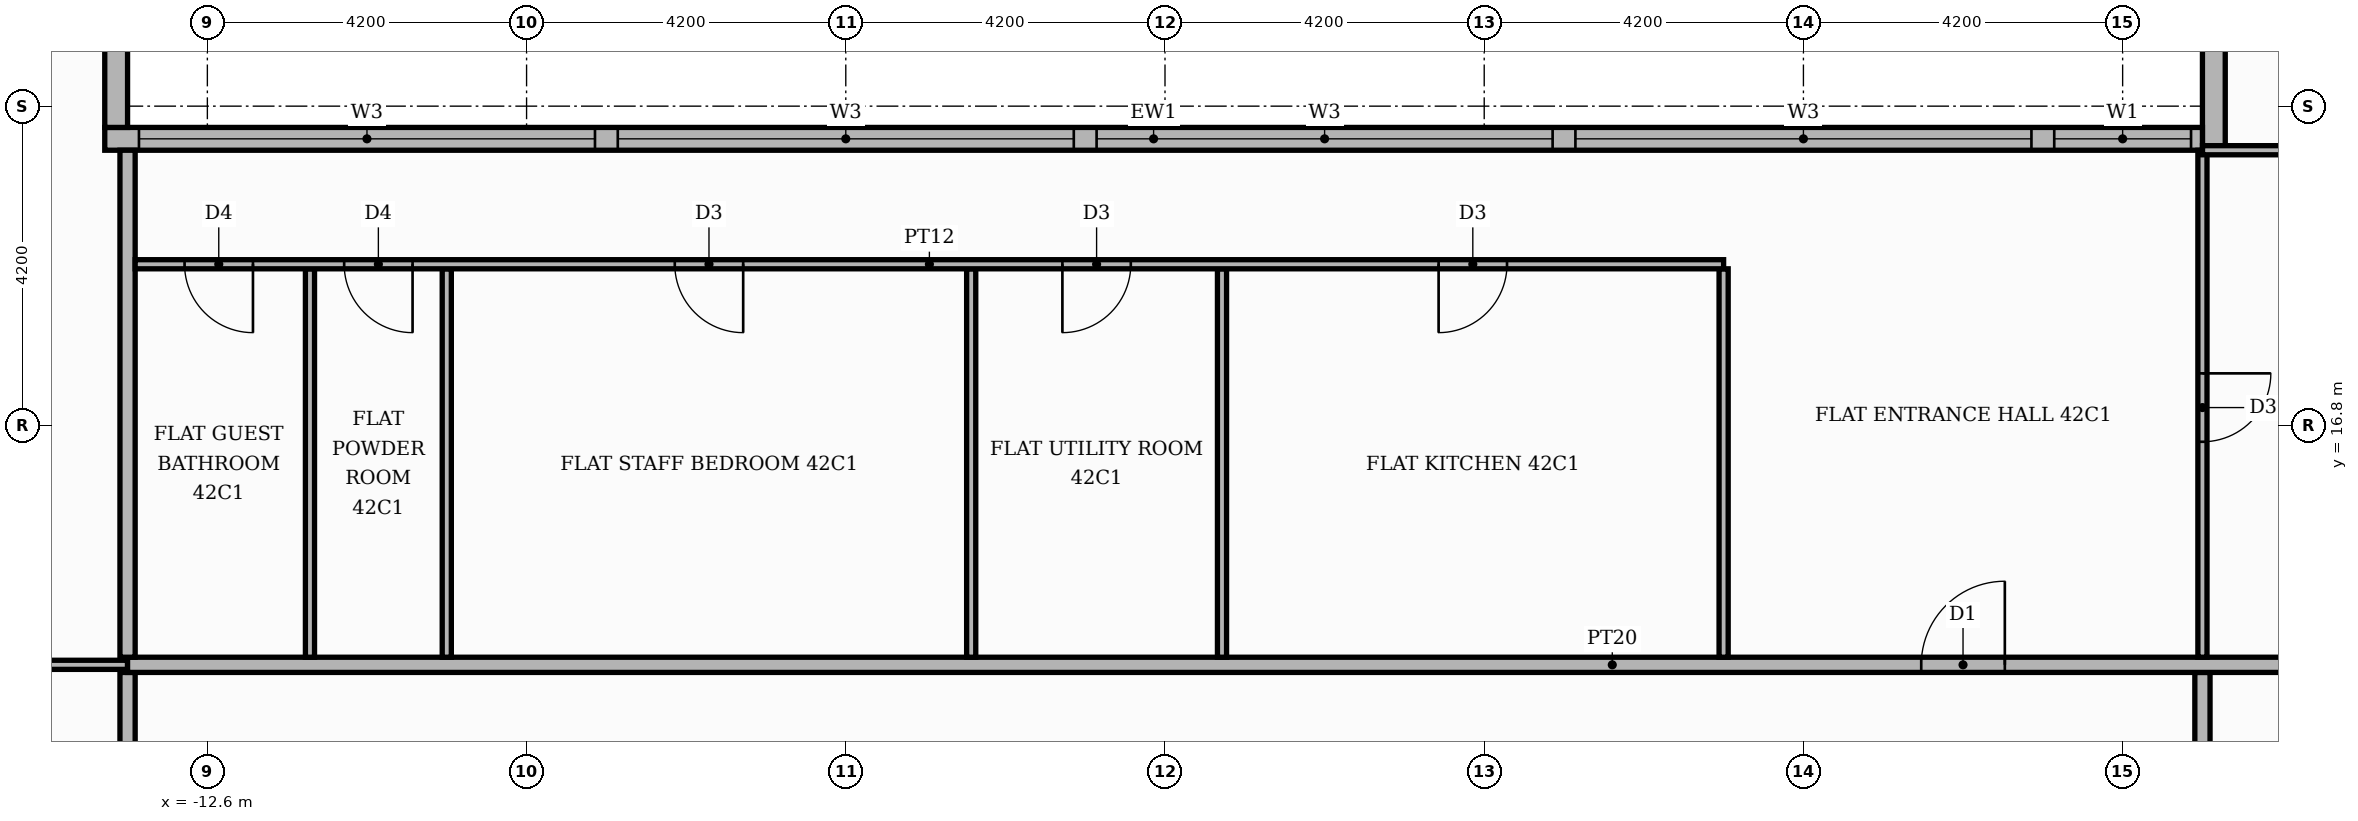
"""IFC4 building model, lengths in metres.
Left out: names, types, materials, properties, quantities, classifications, styles, units other than length and angle.
Written with IfcOpenShell. Run it as: python <this file> out.ifc"""

import sys

from ifc_helpers import new_model, si_unit, direction, frame, frame_2d, origin, place, context, subcontext, project, spatial, rectangle, extrude, element, fill, save


model = new_model("IFC4")
c1 = context("Model", 3, precision=1e-05, world=origin(), true_north=direction((0.0, 1.0)))
c2 = subcontext(c1, "Body", "Model", "MODEL_VIEW")
j1 = project(units=[si_unit("LENGTHUNIT", "METRE"), si_unit("PLANEANGLEUNIT", "RADIAN")], contexts=[c1])
p1 = place(None, origin())
s1 = spatial("IfcSite", under=j1, at=p1, CompositionType="ELEMENT")
p2 = place(p1, origin())
s2 = spatial("IfcBuilding", under=s1, at=p2, CompositionType="ELEMENT")
p3 = place(p2, frame((0.0, 0.0, 176.7)))
s3 = spatial("IfcBuildingStorey", under=s2, at=p3, CompositionType="ELEMENT", Elevation=176.7)
p4 = place(p3, frame((13.8, 25.42, 0.0), z_axis=(0.0, 0.0, 1.0), x_axis=(0.0, -1.0, 0.0)))
e1 = element("IfcWall", 1, at=p4, inside=s3, PredefinedType="STANDARD", context=c2, shape_type="SweptSolid", body=[
    extrude(rectangle(XDim=5.0, YDim=0.3, at=frame_2d((2.5, 0.0))), origin(), (0.0, 0.0, 1.0), 3.4),
])
p5 = place(p4, frame((1.42, 0.0, 0.9)))
e2 = element("IfcOpeningElement", 2, at=p5, cuts=e1, PredefinedType="OPENING", context=c2, shape_type="SweptSolid", body=[
    extrude(rectangle(XDim=1.8, YDim=2.1, at=frame_2d((0.9, 1.05))), frame((0.0, 0.16, 0.0), z_axis=(0.0, -1.0, 0.0), x_axis=(1.0, 0.0, 0.0)), (0.0, 0.0, 1.0), 0.32),
])
p6 = place(p3, frame((13.65, 20.57, 0.0), z_axis=(0.0, 0.0, 1.0), x_axis=(-1.0, 0.0, 0.0)))
e3 = element("IfcWall", 3, at=p6, inside=s3, PredefinedType="STANDARD", context=c2, shape_type="SweptSolid", body=[
    extrude(rectangle(XDim=27.6, YDim=0.3, at=frame_2d((13.8, 0.0))), origin(), (0.0, 0.0, 1.0), 3.4),
])
p7 = place(p6, frame((0.15, 0.0, 0.9)))
e4 = element("IfcOpeningElement", 4, at=p7, cuts=e3, PredefinedType="OPENING", context=c2, shape_type="SweptSolid", body=[
    extrude(rectangle(XDim=1.8, YDim=2.1, at=frame_2d((0.9, 1.05))), frame((0.0, 0.16, 0.0), z_axis=(0.0, -1.0, 0.0), x_axis=(1.0, 0.0, 0.0)), (0.0, 0.0, 1.0), 0.32),
])
p8 = place(p6, frame((2.25, 0.0, 0.9)))
e5 = element("IfcOpeningElement", 5, at=p8, cuts=e3, PredefinedType="OPENING", context=c2, shape_type="SweptSolid", body=[
    extrude(rectangle(XDim=6.0, YDim=2.1, at=frame_2d((3.0, 1.05))), frame((0.0, 0.16, 0.0), z_axis=(0.0, -1.0, 0.0), x_axis=(1.0, 0.0, 0.0)), (0.0, 0.0, 1.0), 0.32),
])
p9 = place(p6, frame((8.55, 0.0, 0.9)))
e6 = element("IfcOpeningElement", 6, at=p9, cuts=e3, PredefinedType="OPENING", context=c2, shape_type="SweptSolid", body=[
    extrude(rectangle(XDim=6.0, YDim=2.1, at=frame_2d((3.0, 1.05))), frame((0.0, 0.16, 0.0), z_axis=(0.0, -1.0, 0.0), x_axis=(1.0, 0.0, 0.0)), (0.0, 0.0, 1.0), 0.32),
])
p10 = place(p6, frame((14.85, 0.0, 0.9)))
e7 = element("IfcOpeningElement", 7, at=p10, cuts=e3, PredefinedType="OPENING", context=c2, shape_type="SweptSolid", body=[
    extrude(rectangle(XDim=6.0, YDim=2.1, at=frame_2d((3.0, 1.05))), frame((0.0, 0.16, 0.0), z_axis=(0.0, -1.0, 0.0), x_axis=(1.0, 0.0, 0.0)), (0.0, 0.0, 1.0), 0.32),
])
p11 = place(p6, frame((21.15, 0.0, 0.9)))
e8 = element("IfcOpeningElement", 8, at=p11, cuts=e3, PredefinedType="OPENING", context=c2, shape_type="SweptSolid", body=[
    extrude(rectangle(XDim=6.0, YDim=2.1, at=frame_2d((3.0, 1.05))), frame((0.0, 0.16, 0.0), z_axis=(0.0, -1.0, 0.0), x_axis=(1.0, 0.0, 0.0)), (0.0, 0.0, 1.0), 0.32),
])
p12 = place(p3, frame((-13.8, 20.72, 0.0), z_axis=(0.0, 0.0, 1.0), x_axis=(0.0, 1.0, 0.0)))
e9 = element("IfcWall", 9, at=p12, inside=s3, PredefinedType="STANDARD", context=c2, shape_type="SweptSolid", body=[
    extrude(rectangle(XDim=5.0, YDim=0.3, at=frame_2d((2.5, 0.0))), origin(), (0.0, 0.0, 1.0), 3.4),
])
p13 = place(p12, frame((1.48, 0.0, 0.9)))
e10 = element("IfcOpeningElement", 10, at=p13, cuts=e9, PredefinedType="OPENING", context=c2, shape_type="SweptSolid", body=[
    extrude(rectangle(XDim=1.8, YDim=2.1, at=frame_2d((0.9, 1.05))), frame((0.0, 0.16, 0.0), z_axis=(0.0, -1.0, 0.0), x_axis=(1.0, 0.0, 0.0)), (0.0, 0.0, 1.0), 0.32),
])
for number, where, z_axis, x_axis in (
    (11, (-13.65, 11.1, 0.0), (0.0, 0.0, 1.0), (0.0, 1.0, 0.0)),
    (12, (13.65, 11.1, 0.0), (0.0, 0.0, 1.0), (0.0, 1.0, 0.0)),
):
    element("IfcWall", number, at=place(p3, frame(where, z_axis=z_axis, x_axis=x_axis)), inside=s3, PredefinedType="PARTITIONING", context=c2, shape_type="SweptSolid", body=[
        extrude(rectangle(XDim=2.45, YDim=0.2, at=frame_2d((1.225, 0.0))), origin(), (0.0, 0.0, 1.0), 3.4),
    ])
p14 = place(p3, frame((-20.72, 13.65, 0.0), z_axis=(0.0, 0.0, 1.0), x_axis=(1.0, 0.0, 0.0)))
e13 = element("IfcWall", 13, at=p14, inside=s3, PredefinedType="PARTITIONING", context=c2, shape_type="SweptSolid", body=[
    extrude(rectangle(XDim=7.07, YDim=0.12, at=frame_2d((3.535, 0.0))), origin(), (0.0, 0.0, 1.0), 3.4),
])
p15 = place(p14, frame((3.085, 0.0, 0.0)))
e14 = element("IfcOpeningElement", 14, at=p15, cuts=e13, PredefinedType="OPENING", context=c2, shape_type="SweptSolid", body=[
    extrude(rectangle(XDim=0.9, YDim=2.1, at=frame_2d((0.45, 1.05))), frame((0.0, 0.07, 0.0), z_axis=(0.0, -1.0, 0.0), x_axis=(1.0, 0.0, 0.0)), (0.0, 0.0, 1.0), 0.14),
])
p16 = place(p3, frame((-13.65, 13.65, 0.0), z_axis=(0.0, 0.0, 1.0), x_axis=(1.0, 0.0, 0.0)))
e15 = element("IfcWall", 15, at=p16, inside=s3, PredefinedType="PARTITIONING", context=c2, shape_type="SweptSolid", body=[
    extrude(rectangle(XDim=39.07, YDim=0.2, at=frame_2d((19.535, 0.0))), origin(), (0.0, 0.0, 1.0), 3.4),
])
p17 = place(p16, frame((23.6, 0.0, 0.0)))
e16 = element("IfcOpeningElement", 16, at=p17, cuts=e15, PredefinedType="OPENING", context=c2, shape_type="SweptSolid", body=[
    extrude(rectangle(XDim=1.1, YDim=2.4, at=frame_2d((0.55, 1.2))), frame((0.0, 0.11, 0.0), z_axis=(0.0, -1.0, 0.0), x_axis=(1.0, 0.0, 0.0)), (0.0, 0.0, 1.0), 0.22),
])
p18 = place(p3, frame((-13.65, 13.75, 0.0), z_axis=(0.0, 0.0, 1.0), x_axis=(0.0, 1.0, 0.0)))
e17 = element("IfcWall", 17, at=p18, inside=s3, PredefinedType="PARTITIONING", context=c2, shape_type="SweptSolid", body=[
    extrude(rectangle(XDim=6.67, YDim=0.2, at=frame_2d((3.335, 0.0))), origin(), (0.0, 0.0, 1.0), 3.4),
])
for number, where, z_axis, x_axis in (
    (18, (-11.25, 13.75, 0.0), (0.0, 0.0, 1.0), (0.0, 1.0, 0.0)),
    (19, (-9.45, 13.75, 0.0), (0.0, 0.0, 1.0), (0.0, 1.0, 0.0)),
    (20, (-2.55, 13.75, 0.0), (0.0, 0.0, 1.0), (0.0, 1.0, 0.0)),
    (21, (0.75, 13.75, 0.0), (0.0, 0.0, 1.0), (0.0, 1.0, 0.0)),
    (22, (7.35, 13.75, 0.0), (0.0, 0.0, 1.0), (0.0, 1.0, 0.0)),
):
    element("IfcWall", number, at=place(p3, frame(where, z_axis=z_axis, x_axis=x_axis)), inside=s3, PredefinedType="PARTITIONING", context=c2, shape_type="SweptSolid", body=[
        extrude(rectangle(XDim=5.11, YDim=0.12, at=frame_2d((2.555, 0.0))), origin(), (0.0, 0.0, 1.0), 3.4),
    ])
p19 = place(p3, frame((13.65, 13.75, 0.0), z_axis=(0.0, 0.0, 1.0), x_axis=(0.0, 1.0, 0.0)))
e23 = element("IfcWall", 23, at=p19, inside=s3, PredefinedType="PARTITIONING", context=c2, shape_type="SweptSolid", body=[
    extrude(rectangle(XDim=6.669, YDim=0.12, at=frame_2d((3.334, 0.0))), origin(), (0.0, 0.0, 1.0), 3.4),
])
p20 = place(p19, frame((2.834, 0.0, 0.0)))
e24 = element("IfcOpeningElement", 24, at=p20, cuts=e23, PredefinedType="OPENING", context=c2, shape_type="SweptSolid", body=[
    extrude(rectangle(XDim=0.9, YDim=2.1, at=frame_2d((0.45, 1.05))), frame((0.0, 0.07, 0.0), z_axis=(0.0, -1.0, 0.0), x_axis=(1.0, 0.0, 0.0)), (0.0, 0.0, 1.0), 0.14),
])
p21 = place(p3, frame((-13.55, 18.92, 0.0), z_axis=(0.0, 0.0, 1.0), x_axis=(1.0, 0.0, 0.0)))
e25 = element("IfcWall", 25, at=p21, inside=s3, PredefinedType="PARTITIONING", context=c2, shape_type="SweptSolid", body=[
    extrude(rectangle(XDim=20.9, YDim=0.12, at=frame_2d((10.45, 0.0))), origin(), (0.0, 0.0, 1.0), 3.4),
])
p22 = place(p21, frame((17.15, 0.0, 0.0)))
e26 = element("IfcOpeningElement", 26, at=p22, cuts=e25, PredefinedType="OPENING", context=c2, shape_type="SweptSolid", body=[
    extrude(rectangle(XDim=0.9, YDim=2.1, at=frame_2d((0.45, 1.05))), frame((0.0, 0.07, 0.0), z_axis=(0.0, -1.0, 0.0), x_axis=(1.0, 0.0, 0.0)), (0.0, 0.0, 1.0), 0.14),
])
p23 = place(p21, frame((12.2, 0.0, 0.0)))
e27 = element("IfcOpeningElement", 27, at=p23, cuts=e25, PredefinedType="OPENING", context=c2, shape_type="SweptSolid", body=[
    extrude(rectangle(XDim=0.9, YDim=2.1, at=frame_2d((0.45, 1.05))), frame((0.0, 0.07, 0.0), z_axis=(0.0, -1.0, 0.0), x_axis=(1.0, 0.0, 0.0)), (0.0, 0.0, 1.0), 0.14),
])
p24 = place(p21, frame((7.1, 0.0, 0.0)))
e28 = element("IfcOpeningElement", 28, at=p24, cuts=e25, PredefinedType="OPENING", context=c2, shape_type="SweptSolid", body=[
    extrude(rectangle(XDim=0.9, YDim=2.1, at=frame_2d((0.45, 1.05))), frame((0.0, 0.07, 0.0), z_axis=(0.0, -1.0, 0.0), x_axis=(1.0, 0.0, 0.0)), (0.0, 0.0, 1.0), 0.14),
])
p25 = place(p21, frame((2.75, 0.0, 0.0)))
e29 = element("IfcOpeningElement", 29, at=p25, cuts=e25, PredefinedType="OPENING", context=c2, shape_type="SweptSolid", body=[
    extrude(rectangle(XDim=0.9, YDim=2.1, at=frame_2d((0.45, 1.05))), frame((0.0, 0.07, 0.0), z_axis=(0.0, -1.0, 0.0), x_axis=(1.0, 0.0, 0.0)), (0.0, 0.0, 1.0), 0.14),
])
p26 = place(p21, frame((0.65, 0.0, 0.0)))
e30 = element("IfcOpeningElement", 30, at=p26, cuts=e25, PredefinedType="OPENING", context=c2, shape_type="SweptSolid", body=[
    extrude(rectangle(XDim=0.9, YDim=2.1, at=frame_2d((0.45, 1.05))), frame((0.0, 0.07, 0.0), z_axis=(0.0, -1.0, 0.0), x_axis=(1.0, 0.0, 0.0)), (0.0, 0.0, 1.0), 0.14),
])
p27 = place(p3, frame((13.651, 20.42, 0.0), z_axis=(0.0, 0.0, 1.0), x_axis=(1.0, 0.0, 0.0)))
e31 = element("IfcWall", 31, at=p27, inside=s3, PredefinedType="PARTITIONING", context=c2, shape_type="SweptSolid", body=[
    extrude(rectangle(XDim=11.769, YDim=0.12, at=frame_2d((5.885, 0.0))), origin(), (0.0, 0.0, 1.0), 3.4),
])
p28 = place(p27, frame((7.345, 0.0, 0.0)))
e32 = element("IfcOpeningElement", 32, at=p28, cuts=e31, PredefinedType="OPENING", context=c2, shape_type="SweptSolid", body=[
    extrude(rectangle(XDim=1.0, YDim=2.1, at=frame_2d((0.5, 1.05))), frame((0.0, 0.07, 0.0), z_axis=(0.0, -1.0, 0.0), x_axis=(1.0, 0.0, 0.0)), (0.0, 0.0, 1.0), 0.14),
])
p29 = place(p7, origin())
e33 = element("IfcWindow", 33, at=p29, inside=s3, PartitioningType="SINGLE_PANEL", PredefinedType="WINDOW", context=c2, shape_type="SweptSolid", body=[
    extrude(rectangle(XDim=1.8, YDim=2.1, at=frame_2d((0.9, 1.05))), frame((0.0, 0.03, 0.0), z_axis=(0.0, -1.0, 0.0), x_axis=(1.0, 0.0, 0.0)), (0.0, 0.0, 1.0), 0.06),
])
fill(e4, e33)
p30 = place(p8, origin())
e34 = element("IfcWindow", 34, at=p30, inside=s3, PartitioningType="SINGLE_PANEL", PredefinedType="WINDOW", context=c2, shape_type="SweptSolid", body=[
    extrude(rectangle(XDim=6.0, YDim=2.1, at=frame_2d((3.0, 1.05))), frame((0.0, 0.03, 0.0), z_axis=(0.0, -1.0, 0.0), x_axis=(1.0, 0.0, 0.0)), (0.0, 0.0, 1.0), 0.06),
])
fill(e5, e34)
p31 = place(p9, origin())
e35 = element("IfcWindow", 35, at=p31, inside=s3, PartitioningType="SINGLE_PANEL", PredefinedType="WINDOW", context=c2, shape_type="SweptSolid", body=[
    extrude(rectangle(XDim=6.0, YDim=2.1, at=frame_2d((3.0, 1.05))), frame((0.0, 0.03, 0.0), z_axis=(0.0, -1.0, 0.0), x_axis=(1.0, 0.0, 0.0)), (0.0, 0.0, 1.0), 0.06),
])
fill(e6, e35)
p32 = place(p10, origin())
e36 = element("IfcWindow", 36, at=p32, inside=s3, PartitioningType="SINGLE_PANEL", PredefinedType="WINDOW", context=c2, shape_type="SweptSolid", body=[
    extrude(rectangle(XDim=6.0, YDim=2.1, at=frame_2d((3.0, 1.05))), frame((0.0, 0.03, 0.0), z_axis=(0.0, -1.0, 0.0), x_axis=(1.0, 0.0, 0.0)), (0.0, 0.0, 1.0), 0.06),
])
fill(e7, e36)
p33 = place(p11, origin())
e37 = element("IfcWindow", 37, at=p33, inside=s3, PartitioningType="SINGLE_PANEL", PredefinedType="WINDOW", context=c2, shape_type="SweptSolid", body=[
    extrude(rectangle(XDim=6.0, YDim=2.1, at=frame_2d((3.0, 1.05))), frame((0.0, 0.03, 0.0), z_axis=(0.0, -1.0, 0.0), x_axis=(1.0, 0.0, 0.0)), (0.0, 0.0, 1.0), 0.06),
])
fill(e8, e37)
p34 = place(p17, origin())
e38 = element("IfcDoor", 38, at=p34, inside=s3, OperationType="SINGLE_SWING_RIGHT", PredefinedType="DOOR", context=c2, shape_type="SweptSolid", body=[
    extrude(rectangle(XDim=1.1, YDim=2.4, at=frame_2d((0.55, 1.2))), frame((0.0, 0.025, 0.0), z_axis=(0.0, -1.0, 0.0), x_axis=(1.0, 0.0, 0.0)), (0.0, 0.0, 1.0), 0.05),
])
fill(e16, e38)
p35 = place(p20, frame((0.9, 0.0, 0.0), z_axis=(0.0, 0.0, 1.0), x_axis=(-1.0, 0.0, 0.0)))
e39 = element("IfcDoor", 39, at=p35, inside=s3, OperationType="SINGLE_SWING_RIGHT", PredefinedType="DOOR", context=c2, shape_type="SweptSolid", body=[
    extrude(rectangle(XDim=0.9, YDim=2.1, at=frame_2d((0.45, 1.05))), frame((0.0, 0.025, 0.0), z_axis=(0.0, -1.0, 0.0), x_axis=(1.0, 0.0, 0.0)), (0.0, 0.0, 1.0), 0.05),
])
fill(e24, e39)
p36 = place(p22, frame((0.9, 0.0, 0.0), z_axis=(0.0, 0.0, 1.0), x_axis=(-1.0, 0.0, 0.0)))
e40 = element("IfcDoor", 40, at=p36, inside=s3, OperationType="SINGLE_SWING_LEFT", PredefinedType="DOOR", context=c2, shape_type="SweptSolid", body=[
    extrude(rectangle(XDim=0.9, YDim=2.1, at=frame_2d((0.45, 1.05))), frame((0.0, 0.025, 0.0), z_axis=(0.0, -1.0, 0.0), x_axis=(1.0, 0.0, 0.0)), (0.0, 0.0, 1.0), 0.05),
])
fill(e26, e40)
p37 = place(p23, frame((0.9, 0.0, 0.0), z_axis=(0.0, 0.0, 1.0), x_axis=(-1.0, 0.0, 0.0)))
e41 = element("IfcDoor", 41, at=p37, inside=s3, OperationType="SINGLE_SWING_LEFT", PredefinedType="DOOR", context=c2, shape_type="SweptSolid", body=[
    extrude(rectangle(XDim=0.9, YDim=2.1, at=frame_2d((0.45, 1.05))), frame((0.0, 0.025, 0.0), z_axis=(0.0, -1.0, 0.0), x_axis=(1.0, 0.0, 0.0)), (0.0, 0.0, 1.0), 0.05),
])
fill(e27, e41)
p38 = place(p24, frame((0.9, 0.0, 0.0), z_axis=(0.0, 0.0, 1.0), x_axis=(-1.0, 0.0, 0.0)))
e42 = element("IfcDoor", 42, at=p38, inside=s3, OperationType="SINGLE_SWING_RIGHT", PredefinedType="DOOR", context=c2, shape_type="SweptSolid", body=[
    extrude(rectangle(XDim=0.9, YDim=2.1, at=frame_2d((0.45, 1.05))), frame((0.0, 0.025, 0.0), z_axis=(0.0, -1.0, 0.0), x_axis=(1.0, 0.0, 0.0)), (0.0, 0.0, 1.0), 0.05),
])
fill(e28, e42)
p39 = place(p25, frame((0.9, 0.0, 0.0), z_axis=(0.0, 0.0, 1.0), x_axis=(-1.0, 0.0, 0.0)))
e43 = element("IfcDoor", 43, at=p39, inside=s3, OperationType="SINGLE_SWING_RIGHT", PredefinedType="DOOR", context=c2, shape_type="SweptSolid", body=[
    extrude(rectangle(XDim=0.9, YDim=2.1, at=frame_2d((0.45, 1.05))), frame((0.0, 0.025, 0.0), z_axis=(0.0, -1.0, 0.0), x_axis=(1.0, 0.0, 0.0)), (0.0, 0.0, 1.0), 0.05),
])
fill(e29, e43)
p40 = place(p26, frame((0.9, 0.0, 0.0), z_axis=(0.0, 0.0, 1.0), x_axis=(-1.0, 0.0, 0.0)))
e44 = element("IfcDoor", 44, at=p40, inside=s3, OperationType="SINGLE_SWING_RIGHT", PredefinedType="DOOR", context=c2, shape_type="SweptSolid", body=[
    extrude(rectangle(XDim=0.9, YDim=2.1, at=frame_2d((0.45, 1.05))), frame((0.0, 0.025, 0.0), z_axis=(0.0, -1.0, 0.0), x_axis=(1.0, 0.0, 0.0)), (0.0, 0.0, 1.0), 0.05),
])
fill(e30, e44)
save(model, sys.argv[1])
